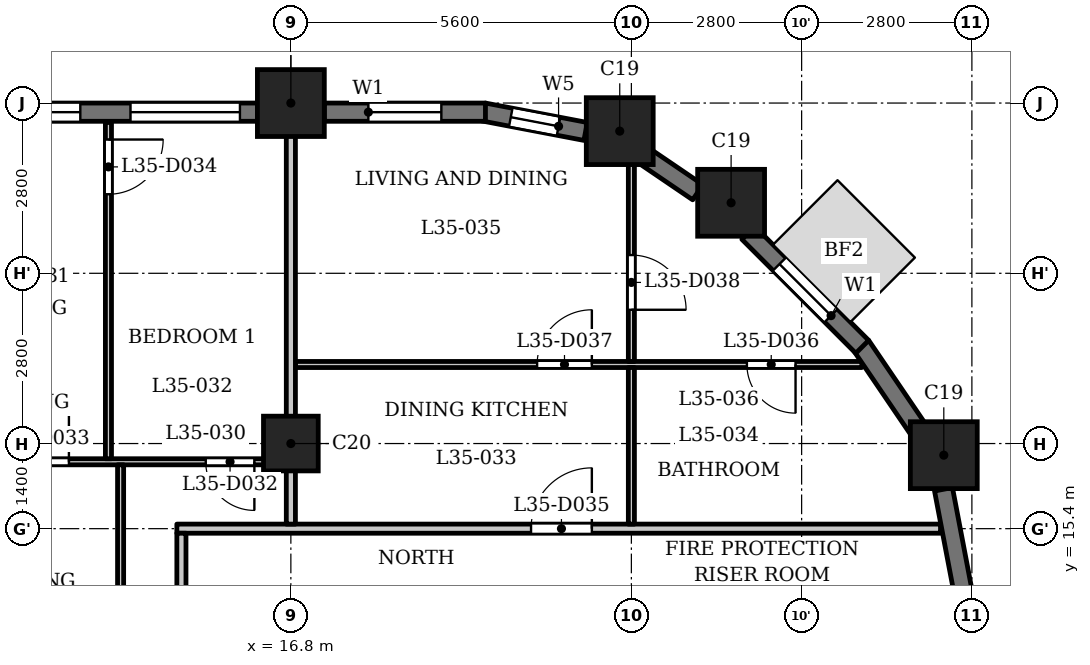
"""IFC4 building model, lengths in metres.
Left out: names, types, materials, properties, quantities, classifications, styles, units other than length and angle.
Written with IfcOpenShell. Run it as: python <this file> out.ifc"""

import sys

from ifc_helpers import new_model, si_unit, direction, frame, frame_2d, origin, origin_2d, place, context, subcontext, project, spatial, rectangle, extrude, element, fill, save


model = new_model("IFC4")
c1 = context("Model", 3, precision=1e-05, world=origin(), true_north=direction((0.0, 1.0)))
c2 = subcontext(c1, "Body", "Model", "MODEL_VIEW")
j1 = project(units=[si_unit("LENGTHUNIT", "METRE"), si_unit("PLANEANGLEUNIT", "RADIAN")], contexts=[c1])
p1 = place(None, origin())
s1 = spatial("IfcSite", under=j1, at=p1, CompositionType="ELEMENT")
p2 = place(p1, origin())
s2 = spatial("IfcBuilding", under=s1, at=p2, CompositionType="ELEMENT")
p3 = place(p2, frame((0.0, 0.0, 139.6)))
s3 = spatial("IfcBuildingStorey", under=s2, at=p3, CompositionType="ELEMENT", Elevation=139.6)
for number, where, z_axis, x_axis in (
    (1, (27.538, 16.609, 0.0), (0.0, 0.0, 1.0), (1.0, 0.0, 0.0)),
    (2, (24.04, 20.76, 0.0), (0.0, 0.0, 1.0), (1.0, 0.0, 0.0)),
    (3, (22.209, 21.938, 0.0), (0.0, 0.0, 1.0), (1.0, 0.0, 0.0)),
    (4, (16.8, 22.4, 0.0), (0.0, 0.0, 1.0), (1.0, 0.0, 0.0)),
):
    element("IfcColumn", number, at=place(p3, frame(where, z_axis=z_axis, x_axis=x_axis)), inside=s3, PredefinedType="COLUMN", context=c2, shape_type="SweptSolid", body=[
        extrude(rectangle(XDim=1.1, YDim=1.1, at=origin_2d()), origin(), (0.0, 0.0, 1.0), 3.5),
    ])
p4 = place(p3, frame((16.8, 16.8, 0.0), z_axis=(0.0, 0.0, 1.0), x_axis=(1.0, 0.0, 0.0)))
e5 = element("IfcColumn", 5, at=p4, inside=s3, PredefinedType="COLUMN", context=c2, shape_type="SweptSolid", body=[
    extrude(rectangle(XDim=0.9, YDim=0.9, at=origin_2d()), origin(), (0.0, 0.0, 1.0), 3.5),
])
p5 = place(p3, frame((27.853, 14.372, 0.0), z_axis=(0.0, 0.0, 1.0), x_axis=(-0.187302784601, 0.982302227871, 0.0)))
e6 = element("IfcWall", 6, at=p5, inside=s3, PredefinedType="SOLIDWALL", context=c2, shape_type="SweptSolid", body=[
    extrude(rectangle(XDim=1.706, YDim=0.3, at=frame_2d((0.853, 0.0))), origin(), (0.0, 0.0, 1.0), 2.45),
])
p6 = place(p3, frame((27.138, 17.002, 0.0), z_axis=(0.0, 0.0, 1.0), x_axis=(-0.562075160946, 0.827086158419, 0.0)))
e7 = element("IfcWall", 7, at=p6, inside=s3, PredefinedType="SOLIDWALL", context=c2, shape_type="SweptSolid", body=[
    extrude(rectangle(XDim=1.706, YDim=0.3, at=frame_2d((0.853, 0.0))), origin(), (0.0, 0.0, 1.0), 2.45),
])
p7 = place(p3, frame((26.197, 18.391, 0.0), z_axis=(0.0, 0.0, 1.0), x_axis=(-0.707060717099, 0.707152842274, 0.0)))
e8 = element("IfcWall", 8, at=p7, inside=s3, PredefinedType="SOLIDWALL", context=c2, shape_type="SweptSolid", body=[
    extrude(rectangle(XDim=2.65, YDim=0.3, at=frame_2d((1.325, 0.0))), origin(), (0.0, 0.0, 1.0), 2.45),
])
p8 = place(p7, frame((0.725, 0.0, 0.6)))
e9 = element("IfcOpeningElement", 9, at=p8, cuts=e8, PredefinedType="OPENING", context=c2, shape_type="SweptSolid", body=[
    extrude(rectangle(XDim=1.2, YDim=1.55, at=frame_2d((0.6, 0.775))), frame((0.0, 0.16, 0.0), z_axis=(0.0, -1.0, 0.0), x_axis=(1.0, 0.0, 0.0)), (0.0, 0.0, 1.0), 0.32),
])
p9 = place(p3, frame((23.492, 20.932, 0.0), z_axis=(0.0, 0.0, 1.0), x_axis=(-0.826993959827, 0.562210806023, 0.0)))
e10 = element("IfcWall", 10, at=p9, inside=s3, PredefinedType="SOLIDWALL", context=c2, shape_type="SweptSolid", body=[
    extrude(rectangle(XDim=1.077, YDim=0.3, at=frame_2d((0.539, 0.0))), origin(), (0.0, 0.0, 1.0), 3.2),
])
p10 = place(p3, frame((21.648, 21.933, 0.0), z_axis=(0.0, 0.0, 1.0), x_axis=(-0.982297206936, 0.187329114784, 0.0)))
e11 = element("IfcWall", 11, at=p10, inside=s3, PredefinedType="SOLIDWALL", context=c2, shape_type="SweptSolid", body=[
    extrude(rectangle(XDim=1.706, YDim=0.3, at=frame_2d((0.853, 0.0))), origin(), (0.0, 0.0, 1.0), 2.45),
])
p11 = place(p10, frame((0.453, 0.0, 0.6)))
e12 = element("IfcOpeningElement", 12, at=p11, cuts=e11, PredefinedType="OPENING", context=c2, shape_type="SweptSolid", body=[
    extrude(rectangle(XDim=0.8, YDim=1.55, at=frame_2d((0.4, 0.775))), frame((0.0, 0.16, 0.0), z_axis=(0.0, -1.0, 0.0), x_axis=(1.0, 0.0, 0.0)), (0.0, 0.0, 1.0), 0.32),
])
p12 = place(p3, frame((20.0, 22.25, 0.0), z_axis=(0.0, 0.0, 1.0), x_axis=(-1.0, 0.0, 0.0)))
e13 = element("IfcWall", 13, at=p12, inside=s3, PredefinedType="SOLIDWALL", context=c2, shape_type="SweptSolid", body=[
    extrude(rectangle(XDim=2.65, YDim=0.3, at=frame_2d((1.325, 0.0))), origin(), (0.0, 0.0, 1.0), 2.45),
])
p13 = place(p12, frame((0.725, 0.0, 0.6)))
e14 = element("IfcOpeningElement", 14, at=p13, cuts=e13, PredefinedType="OPENING", context=c2, shape_type="SweptSolid", body=[
    extrude(rectangle(XDim=1.2, YDim=1.55, at=frame_2d((0.6, 0.775))), frame((0.0, 0.16, 0.0), z_axis=(0.0, -1.0, 0.0), x_axis=(1.0, 0.0, 0.0)), (0.0, 0.0, 1.0), 0.32),
])
p14 = place(p3, frame((16.25, 22.25, 0.0), z_axis=(0.0, 0.0, 1.0), x_axis=(-1.0, 0.0, 0.0)))
e15 = element("IfcWall", 15, at=p14, inside=s3, PredefinedType="SOLIDWALL", context=c2, shape_type="SweptSolid", body=[
    extrude(rectangle(XDim=4.5, YDim=0.3, at=frame_2d((2.25, 0.0))), origin(), (0.0, 0.0, 1.0), 2.45),
])
p15 = place(p14, frame((0.288, 0.0, 0.9)))
e16 = element("IfcOpeningElement", 16, at=p15, cuts=e15, PredefinedType="OPENING", context=c2, shape_type="SweptSolid", body=[
    extrude(rectangle(XDim=1.8, YDim=1.25, at=frame_2d((0.9, 0.625))), frame((0.0, 0.16, 0.0), z_axis=(0.0, -1.0, 0.0), x_axis=(1.0, 0.0, 0.0)), (0.0, 0.0, 1.0), 0.32),
])
p16 = place(p14, frame((2.913, 0.0, 0.6)))
e17 = element("IfcOpeningElement", 17, at=p16, cuts=e15, PredefinedType="OPENING", context=c2, shape_type="SweptSolid", body=[
    extrude(rectangle(XDim=1.2, YDim=1.55, at=frame_2d((0.6, 0.775))), frame((0.0, 0.16, 0.0), z_axis=(0.0, -1.0, 0.0), x_axis=(1.0, 0.0, 0.0)), (0.0, 0.0, 1.0), 0.32),
])
p17 = place(p3, frame((14.925, 15.4, 0.0), z_axis=(0.0, 0.0, 1.0), x_axis=(1.0, 0.0, 0.0)))
e18 = element("IfcWall", 18, at=p17, inside=s3, PredefinedType="PARTITIONING", context=c2, shape_type="SweptSolid", body=[
    extrude(rectangle(XDim=12.559, YDim=0.15, at=frame_2d((6.279, 0.0))), origin(), (0.0, 0.0, 1.0), 3.2),
])
p18 = place(p17, frame((5.825, 0.0, 0.0)))
e19 = element("IfcOpeningElement", 19, at=p18, cuts=e18, PredefinedType="OPENING", context=c2, shape_type="SweptSolid", body=[
    extrude(rectangle(XDim=1.0, YDim=2.1, at=frame_2d((0.5, 1.05))), frame((0.0, 0.085, 0.0), z_axis=(0.0, -1.0, 0.0), x_axis=(1.0, 0.0, 0.0)), (0.0, 0.0, 1.0), 0.17),
])
p19 = place(p3, frame((-16.725, 16.5, 0.0), z_axis=(0.0, 0.0, 1.0), x_axis=(1.0, 0.0, 0.0)))
e20 = element("IfcWall", 20, at=p19, inside=s3, PredefinedType="PARTITIONING", context=c2, shape_type="SweptSolid", body=[
    extrude(rectangle(XDim=33.45, YDim=0.1, at=frame_2d((16.725, 0.0))), origin(), (0.0, 0.0, 1.0), 3.2),
])
p20 = place(p19, frame((9.675, 0.0, 0.0)))
e21 = element("IfcOpeningElement", 21, at=p20, cuts=e20, PredefinedType="OPENING", context=c2, shape_type="SweptSolid", body=[
    extrude(rectangle(XDim=0.8, YDim=2.1, at=frame_2d((0.4, 1.05))), frame((0.0, 0.06, 0.0), z_axis=(0.0, -1.0, 0.0), x_axis=(1.0, 0.0, 0.0)), (0.0, 0.0, 1.0), 0.12),
])
p21 = place(p19, frame((3.975, 0.0, 0.0)))
e22 = element("IfcOpeningElement", 22, at=p21, cuts=e20, PredefinedType="OPENING", context=c2, shape_type="SweptSolid", body=[
    extrude(rectangle(XDim=0.9, YDim=2.1, at=frame_2d((0.45, 1.05))), frame((0.0, 0.06, 0.0), z_axis=(0.0, -1.0, 0.0), x_axis=(1.0, 0.0, 0.0)), (0.0, 0.0, 1.0), 0.12),
])
p22 = place(p19, frame((12.025, 0.0, 0.0)))
e23 = element("IfcOpeningElement", 23, at=p22, cuts=e20, PredefinedType="OPENING", context=c2, shape_type="SweptSolid", body=[
    extrude(rectangle(XDim=0.8, YDim=2.1, at=frame_2d((0.4, 1.05))), frame((0.0, 0.06, 0.0), z_axis=(0.0, -1.0, 0.0), x_axis=(1.0, 0.0, 0.0)), (0.0, 0.0, 1.0), 0.12),
])
p23 = place(p19, frame((15.175, 0.0, 0.0)))
e24 = element("IfcOpeningElement", 24, at=p23, cuts=e20, PredefinedType="OPENING", context=c2, shape_type="SweptSolid", body=[
    extrude(rectangle(XDim=0.9, YDim=2.1, at=frame_2d((0.45, 1.05))), frame((0.0, 0.06, 0.0), z_axis=(0.0, -1.0, 0.0), x_axis=(1.0, 0.0, 0.0)), (0.0, 0.0, 1.0), 0.12),
])
p24 = place(p19, frame((20.975, 0.0, 0.0)))
e25 = element("IfcOpeningElement", 25, at=p24, cuts=e20, PredefinedType="OPENING", context=c2, shape_type="SweptSolid", body=[
    extrude(rectangle(XDim=0.8, YDim=2.1, at=frame_2d((0.4, 1.05))), frame((0.0, 0.06, 0.0), z_axis=(0.0, -1.0, 0.0), x_axis=(1.0, 0.0, 0.0)), (0.0, 0.0, 1.0), 0.12),
])
p25 = place(p19, frame((18.175, 0.0, 0.0)))
e26 = element("IfcOpeningElement", 26, at=p25, cuts=e20, PredefinedType="OPENING", context=c2, shape_type="SweptSolid", body=[
    extrude(rectangle(XDim=0.9, YDim=2.1, at=frame_2d((0.45, 1.05))), frame((0.0, 0.06, 0.0), z_axis=(0.0, -1.0, 0.0), x_axis=(1.0, 0.0, 0.0)), (0.0, 0.0, 1.0), 0.12),
])
p26 = place(p19, frame((23.725, 0.0, 0.0)))
e27 = element("IfcOpeningElement", 27, at=p26, cuts=e20, PredefinedType="OPENING", context=c2, shape_type="SweptSolid", body=[
    extrude(rectangle(XDim=0.8, YDim=2.1, at=frame_2d((0.4, 1.05))), frame((0.0, 0.06, 0.0), z_axis=(0.0, -1.0, 0.0), x_axis=(1.0, 0.0, 0.0)), (0.0, 0.0, 1.0), 0.12),
])
p27 = place(p19, frame((26.125, 0.0, 0.0)))
e28 = element("IfcOpeningElement", 28, at=p27, cuts=e20, PredefinedType="OPENING", context=c2, shape_type="SweptSolid", body=[
    extrude(rectangle(XDim=0.9, YDim=2.1, at=frame_2d((0.45, 1.05))), frame((0.0, 0.06, 0.0), z_axis=(0.0, -1.0, 0.0), x_axis=(1.0, 0.0, 0.0)), (0.0, 0.0, 1.0), 0.12),
])
p28 = place(p19, frame((32.125, 0.0, 0.0)))
e29 = element("IfcOpeningElement", 29, at=p28, cuts=e20, PredefinedType="OPENING", context=c2, shape_type="SweptSolid", body=[
    extrude(rectangle(XDim=0.8, YDim=2.1, at=frame_2d((0.4, 1.05))), frame((0.0, 0.06, 0.0), z_axis=(0.0, -1.0, 0.0), x_axis=(1.0, 0.0, 0.0)), (0.0, 0.0, 1.0), 0.12),
])
p29 = place(p19, frame((28.975, 0.0, 0.0)))
e30 = element("IfcOpeningElement", 30, at=p29, cuts=e20, PredefinedType="OPENING", context=c2, shape_type="SweptSolid", body=[
    extrude(rectangle(XDim=0.9, YDim=2.1, at=frame_2d((0.45, 1.05))), frame((0.0, 0.06, 0.0), z_axis=(0.0, -1.0, 0.0), x_axis=(1.0, 0.0, 0.0)), (0.0, 0.0, 1.0), 0.12),
])
p30 = place(p3, frame((16.875, 18.1, 0.0), z_axis=(0.0, 0.0, 1.0), x_axis=(1.0, 0.0, 0.0)))
e31 = element("IfcWall", 31, at=p30, inside=s3, PredefinedType="PARTITIONING", context=c2, shape_type="SweptSolid", body=[
    extrude(rectangle(XDim=9.315, YDim=0.1, at=frame_2d((4.658, 0.0))), origin(), (0.0, 0.0, 1.0), 3.2),
])
p31 = place(p30, frame((7.425, 0.0, 0.0)))
e32 = element("IfcOpeningElement", 32, at=p31, cuts=e31, PredefinedType="OPENING", context=c2, shape_type="SweptSolid", body=[
    extrude(rectangle(XDim=0.8, YDim=2.1, at=frame_2d((0.4, 1.05))), frame((0.0, 0.06, 0.0), z_axis=(0.0, -1.0, 0.0), x_axis=(1.0, 0.0, 0.0)), (0.0, 0.0, 1.0), 0.12),
])
p32 = place(p30, frame((3.975, 0.0, 0.0)))
e33 = element("IfcOpeningElement", 33, at=p32, cuts=e31, PredefinedType="OPENING", context=c2, shape_type="SweptSolid", body=[
    extrude(rectangle(XDim=0.9, YDim=2.1, at=frame_2d((0.45, 1.05))), frame((0.0, 0.06, 0.0), z_axis=(0.0, -1.0, 0.0), x_axis=(1.0, 0.0, 0.0)), (0.0, 0.0, 1.0), 0.12),
])
p33 = place(p3, frame((13.8, 16.55, 0.0), z_axis=(0.0, 0.0, 1.0), x_axis=(0.0, 1.0, 0.0)))
e34 = element("IfcWall", 34, at=p33, inside=s3, PredefinedType="PARTITIONING", context=c2, shape_type="SweptSolid", body=[
    extrude(rectangle(XDim=5.53, YDim=0.1, at=frame_2d((2.765, 0.0))), origin(), (0.0, 0.0, 1.0), 3.2),
])
p34 = place(p33, frame((4.35, 0.0, 0.0)))
e35 = element("IfcOpeningElement", 35, at=p34, cuts=e34, PredefinedType="OPENING", context=c2, shape_type="SweptSolid", body=[
    extrude(rectangle(XDim=0.9, YDim=2.1, at=frame_2d((0.45, 1.05))), frame((0.0, 0.06, 0.0), z_axis=(0.0, -1.0, 0.0), x_axis=(1.0, 0.0, 0.0)), (0.0, 0.0, 1.0), 0.12),
])
p35 = place(p3, frame((14.0, 13.275, 0.0), z_axis=(0.0, 0.0, 1.0), x_axis=(0.0, 1.0, 0.0)))
e36 = element("IfcWall", 36, at=p35, inside=s3, PredefinedType="PARTITIONING", context=c2, shape_type="SweptSolid", body=[
    extrude(rectangle(XDim=3.175, YDim=0.1, at=frame_2d((1.587, 0.0))), origin(), (0.0, 0.0, 1.0), 3.2),
])
p36 = place(p3, frame((15.0, 13.275, 0.0), z_axis=(0.0, 0.0, 1.0), x_axis=(0.0, 1.0, 0.0)))
e37 = element("IfcWall", 37, at=p36, inside=s3, PredefinedType="PARTITIONING", context=c2, shape_type="SweptSolid", body=[
    extrude(rectangle(XDim=2.05, YDim=0.15, at=frame_2d((1.025, 0.0))), origin(), (0.0, 0.0, 1.0), 3.2),
])
p37 = place(p3, frame((16.8, 15.475, 0.0), z_axis=(0.0, 0.0, 1.0), x_axis=(0.0, 1.0, 0.0)))
e38 = element("IfcWall", 38, at=p37, inside=s3, PredefinedType="PARTITIONING", context=c2, shape_type="SweptSolid", body=[
    extrude(rectangle(XDim=7.455, YDim=0.15, at=frame_2d((3.728, 0.0))), origin(), (0.0, 0.0, 1.0), 3.2),
])
p38 = place(p3, frame((22.4, 15.475, 0.0), z_axis=(0.0, 0.0, 1.0), x_axis=(0.0, 1.0, 0.0)))
e39 = element("IfcWall", 39, at=p38, inside=s3, PredefinedType="PARTITIONING", context=c2, shape_type="SweptSolid", body=[
    extrude(rectangle(XDim=2.575, YDim=0.1, at=frame_2d((1.288, 0.0))), origin(), (0.0, 0.0, 1.0), 3.2),
])
p39 = place(p3, frame((22.4, 18.15, 0.0), z_axis=(0.0, 0.0, 1.0), x_axis=(0.0, 1.0, 0.0)))
e40 = element("IfcWall", 40, at=p39, inside=s3, PredefinedType="PARTITIONING", context=c2, shape_type="SweptSolid", body=[
    extrude(rectangle(XDim=3.57, YDim=0.1, at=frame_2d((1.785, 0.0))), origin(), (0.0, 0.0, 1.0), 3.2),
])
p40 = place(p39, frame((0.85, 0.0, 0.0)))
e41 = element("IfcOpeningElement", 41, at=p40, cuts=e40, PredefinedType="OPENING", context=c2, shape_type="SweptSolid", body=[
    extrude(rectangle(XDim=0.9, YDim=2.1, at=frame_2d((0.45, 1.05))), frame((0.0, 0.06, 0.0), z_axis=(0.0, -1.0, 0.0), x_axis=(1.0, 0.0, 0.0)), (0.0, 0.0, 1.0), 0.12),
])
p41 = place(p28, origin())
e42 = element("IfcDoor", 42, at=p41, inside=s3, OperationType="SINGLE_SWING_RIGHT", PredefinedType="DOOR", context=c2, shape_type="SweptSolid", body=[
    extrude(rectangle(XDim=0.8, YDim=2.1, at=frame_2d((0.4, 1.05))), frame((0.0, 0.025, 0.0), z_axis=(0.0, -1.0, 0.0), x_axis=(1.0, 0.0, 0.0)), (0.0, 0.0, 1.0), 0.05),
])
fill(e29, e42)
p42 = place(p29, origin())
e43 = element("IfcDoor", 43, at=p42, inside=s3, OperationType="SINGLE_SWING_LEFT", PredefinedType="DOOR", context=c2, shape_type="SweptSolid", body=[
    extrude(rectangle(XDim=0.9, YDim=2.1, at=frame_2d((0.45, 1.05))), frame((0.0, 0.025, 0.0), z_axis=(0.0, -1.0, 0.0), x_axis=(1.0, 0.0, 0.0)), (0.0, 0.0, 1.0), 0.05),
])
fill(e30, e43)
p43 = place(p34, origin())
e44 = element("IfcDoor", 44, at=p43, inside=s3, OperationType="SINGLE_SWING_RIGHT", PredefinedType="DOOR", context=c2, shape_type="SweptSolid", body=[
    extrude(rectangle(XDim=0.9, YDim=2.1, at=frame_2d((0.45, 1.05))), frame((0.0, 0.025, 0.0), z_axis=(0.0, -1.0, 0.0), x_axis=(1.0, 0.0, 0.0)), (0.0, 0.0, 1.0), 0.05),
])
fill(e35, e44)
p44 = place(p18, origin())
e45 = element("IfcDoor", 45, at=p44, inside=s3, OperationType="SINGLE_SWING_LEFT", PredefinedType="DOOR", context=c2, shape_type="SweptSolid", body=[
    extrude(rectangle(XDim=1.0, YDim=2.1, at=frame_2d((0.5, 1.05))), frame((0.0, 0.025, 0.0), z_axis=(0.0, -1.0, 0.0), x_axis=(1.0, 0.0, 0.0)), (0.0, 0.0, 1.0), 0.05),
])
fill(e19, e45)
p45 = place(p31, origin())
e46 = element("IfcDoor", 46, at=p45, inside=s3, OperationType="SINGLE_SWING_RIGHT", PredefinedType="DOOR", context=c2, shape_type="SweptSolid", body=[
    extrude(rectangle(XDim=0.8, YDim=2.1, at=frame_2d((0.4, 1.05))), frame((0.0, 0.025, 0.0), z_axis=(0.0, -1.0, 0.0), x_axis=(1.0, 0.0, 0.0)), (0.0, 0.0, 1.0), 0.05),
])
fill(e32, e46)
p46 = place(p32, origin())
e47 = element("IfcDoor", 47, at=p46, inside=s3, OperationType="SINGLE_SWING_LEFT", PredefinedType="DOOR", context=c2, shape_type="SweptSolid", body=[
    extrude(rectangle(XDim=0.9, YDim=2.1, at=frame_2d((0.45, 1.05))), frame((0.0, 0.025, 0.0), z_axis=(0.0, -1.0, 0.0), x_axis=(1.0, 0.0, 0.0)), (0.0, 0.0, 1.0), 0.05),
])
fill(e33, e47)
p47 = place(p40, origin())
e48 = element("IfcDoor", 48, at=p47, inside=s3, OperationType="SINGLE_SWING_LEFT", PredefinedType="DOOR", context=c2, shape_type="SweptSolid", body=[
    extrude(rectangle(XDim=0.9, YDim=2.1, at=frame_2d((0.45, 1.05))), frame((0.0, 0.025, 0.0), z_axis=(0.0, -1.0, 0.0), x_axis=(1.0, 0.0, 0.0)), (0.0, 0.0, 1.0), 0.05),
])
fill(e41, e48)
p48 = place(p8, origin())
e49 = element("IfcWindow", 49, at=p48, inside=s3, PartitioningType="SINGLE_PANEL", PredefinedType="WINDOW", context=c2, shape_type="SweptSolid", body=[
    extrude(rectangle(XDim=1.2, YDim=1.55, at=frame_2d((0.6, 0.775))), frame((0.0, 0.03, 0.0), z_axis=(0.0, -1.0, 0.0), x_axis=(1.0, 0.0, 0.0)), (0.0, 0.0, 1.0), 0.06),
])
fill(e9, e49)
p49 = place(p11, origin())
e50 = element("IfcWindow", 50, at=p49, inside=s3, PartitioningType="SINGLE_PANEL", PredefinedType="WINDOW", context=c2, shape_type="SweptSolid", body=[
    extrude(rectangle(XDim=0.8, YDim=1.55, at=frame_2d((0.4, 0.775))), frame((0.0, 0.03, 0.0), z_axis=(0.0, -1.0, 0.0), x_axis=(1.0, 0.0, 0.0)), (0.0, 0.0, 1.0), 0.06),
])
fill(e12, e50)
p50 = place(p13, origin())
e51 = element("IfcWindow", 51, at=p50, inside=s3, PartitioningType="SINGLE_PANEL", PredefinedType="WINDOW", context=c2, shape_type="SweptSolid", body=[
    extrude(rectangle(XDim=1.2, YDim=1.55, at=frame_2d((0.6, 0.775))), frame((0.0, 0.03, 0.0), z_axis=(0.0, -1.0, 0.0), x_axis=(1.0, 0.0, 0.0)), (0.0, 0.0, 1.0), 0.06),
])
fill(e14, e51)
p51 = place(p15, origin())
e52 = element("IfcWindow", 52, at=p51, inside=s3, PartitioningType="SINGLE_PANEL", PredefinedType="WINDOW", context=c2, shape_type="SweptSolid", body=[
    extrude(rectangle(XDim=1.8, YDim=1.25, at=frame_2d((0.9, 0.625))), frame((0.0, 0.03, 0.0), z_axis=(0.0, -1.0, 0.0), x_axis=(1.0, 0.0, 0.0)), (0.0, 0.0, 1.0), 0.06),
])
fill(e16, e52)
p52 = place(p16, origin())
e53 = element("IfcWindow", 53, at=p52, inside=s3, PartitioningType="SINGLE_PANEL", PredefinedType="WINDOW", context=c2, shape_type="SweptSolid", body=[
    extrude(rectangle(XDim=1.2, YDim=1.55, at=frame_2d((0.6, 0.775))), frame((0.0, 0.03, 0.0), z_axis=(0.0, -1.0, 0.0), x_axis=(1.0, 0.0, 0.0)), (0.0, 0.0, 1.0), 0.06),
])
fill(e17, e53)
save(model, sys.argv[1])
